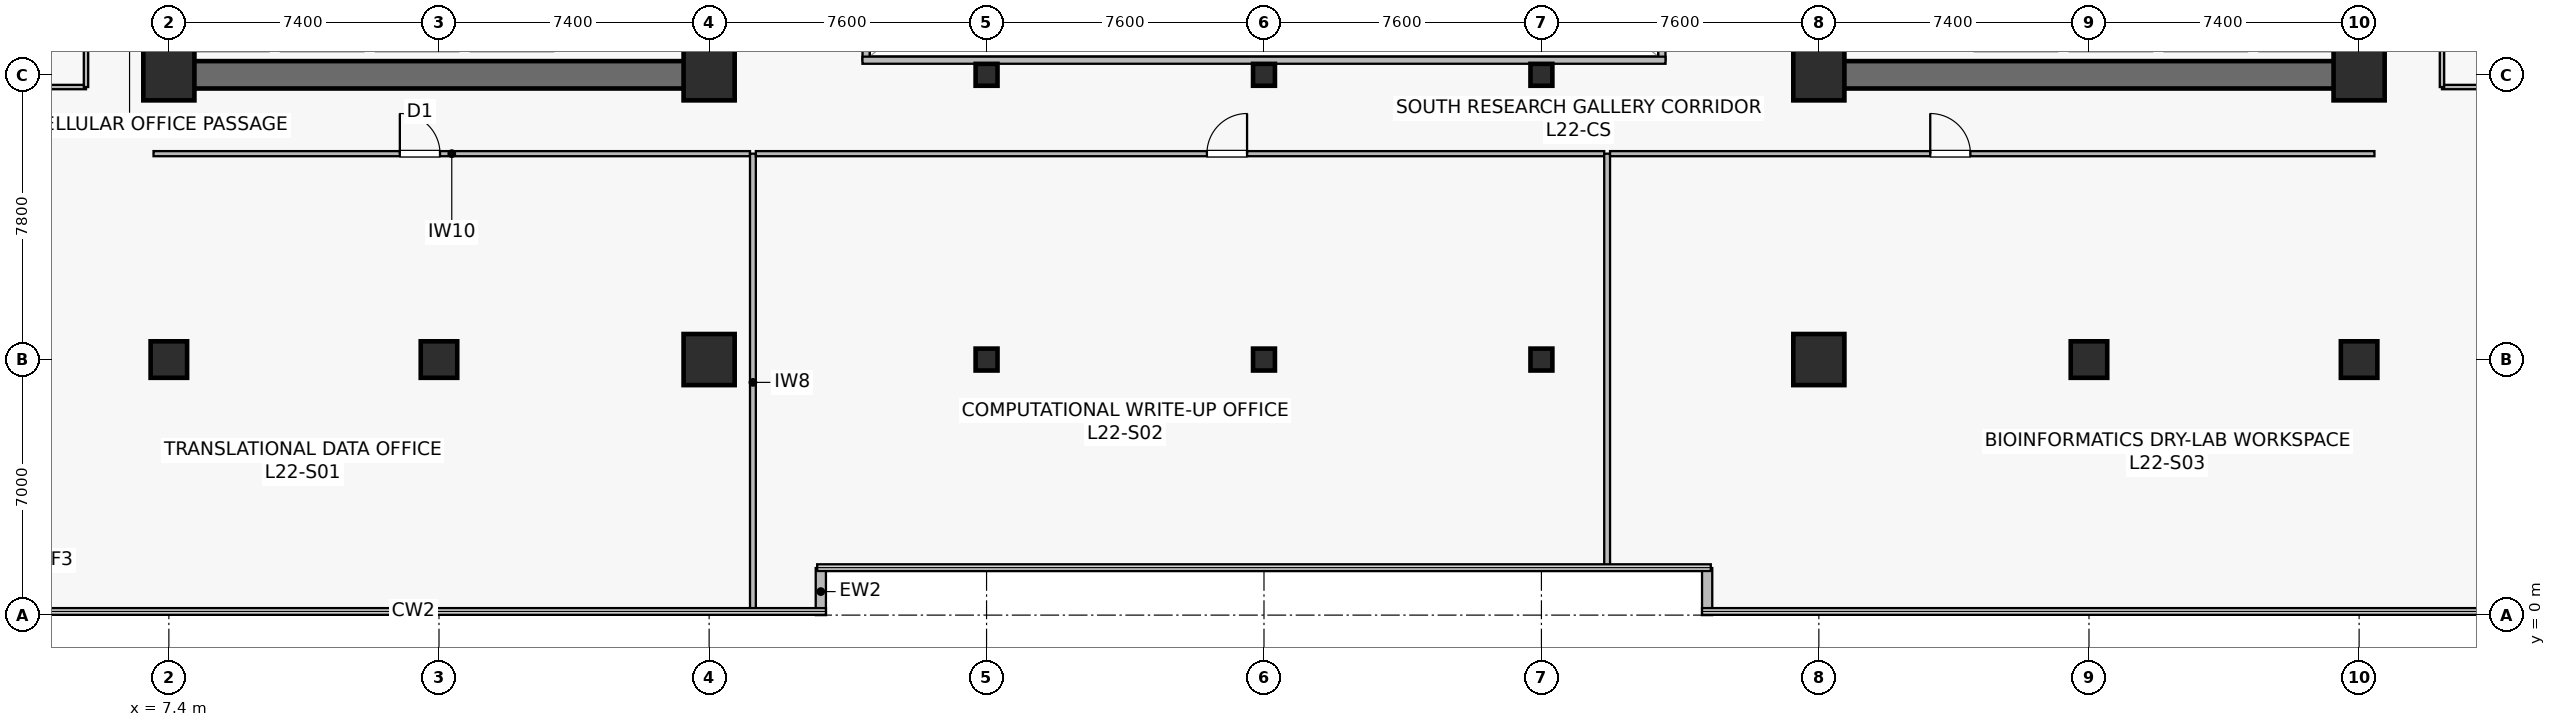
"""IFC4 building model, lengths in metres.
Left out: names, types, materials, properties, quantities, classifications, styles, units other than length and angle.
Written with IfcOpenShell. Run it as: python <this file> out.ifc"""

import sys

from ifc_helpers import new_model, si_unit, direction, frame, frame_2d, origin, origin_2d, place, context, subcontext, project, spatial, rectangle, hollow_rectangle, extrude, source, transform, mapped, element, fill, save


model = new_model("IFC4")
c1 = context("Model", 3, precision=1e-05, world=origin(), true_north=direction((0.0, 1.0)))
c2 = subcontext(c1, "Body", "Model", "MODEL_VIEW")
j1 = project(units=[si_unit("LENGTHUNIT", "METRE"), si_unit("PLANEANGLEUNIT", "RADIAN")], contexts=[c1])
p1 = place(None, origin())
s1 = spatial("IfcSite", under=j1, at=p1, CompositionType="ELEMENT")
p2 = place(p1, origin())
s2 = spatial("IfcBuilding", under=s1, at=p2, CompositionType="ELEMENT")
p3 = place(p2, frame((0.0, 0.0, 90.8)))
s3 = spatial("IfcBuildingStorey", under=s2, at=p3, CompositionType="ELEMENT", Elevation=90.8)
p4 = place(p3, frame((7.025, 14.8, 0.0), z_axis=(0.0, 0.0, 1.0), x_axis=(1.0, 0.0, 0.0)))
e1 = element("IfcWall", 1, at=p4, inside=s3, PredefinedType="SHEAR", context=c2, shape_type="SweptSolid", body=[
    extrude(rectangle(XDim=15.55, YDim=0.75, at=frame_2d((7.775, 0.0))), origin(), (0.0, 0.0, 1.0), 3.78),
])
p5 = place(p3, frame((7.4, 15.175, 0.0), z_axis=(0.0, 0.0, 1.0), x_axis=(0.0, 1.0, 0.0)))
e2 = element("IfcWall", 2, at=p5, inside=s3, PredefinedType="SHEAR", context=c2, shape_type="SweptSolid", body=[
    extrude(rectangle(XDim=18.25, YDim=0.75, at=frame_2d((9.125, 0.0))), origin(), (0.0, 0.0, 1.0), 3.78),
])
p6 = place(p3, frame((22.2, 15.175, 0.0), z_axis=(0.0, 0.0, 1.0), x_axis=(0.0, 1.0, 0.0)))
e3 = element("IfcWall", 3, at=p6, inside=s3, PredefinedType="SHEAR", context=c2, shape_type="SweptSolid", body=[
    extrude(rectangle(XDim=18.25, YDim=0.75, at=frame_2d((9.125, 0.0))), origin(), (0.0, 0.0, 1.0), 3.78),
])
p7 = place(p6, frame((3.375, 0.0, 0.0)))
e4 = element("IfcOpeningElement", 4, at=p7, cuts=e3, PredefinedType="OPENING", context=c2, shape_type="SweptSolid", body=[
    extrude(rectangle(XDim=1.42, YDim=2.2, at=frame_2d((0.71, 1.1))), frame((0.0, 0.385, 0.0), z_axis=(0.0, -1.0, 0.0), x_axis=(1.0, 0.0, 0.0)), (0.0, 0.0, 1.0), 0.77),
])
p8 = place(p3, frame((52.225, 14.8, 0.0), z_axis=(0.0, 0.0, 1.0), x_axis=(1.0, 0.0, 0.0)))
e5 = element("IfcWall", 5, at=p8, inside=s3, PredefinedType="SHEAR", context=c2, shape_type="SweptSolid", body=[
    extrude(rectangle(XDim=15.55, YDim=0.75, at=frame_2d((7.775, 0.0))), origin(), (0.0, 0.0, 1.0), 3.78),
])
p9 = place(p3, frame((52.6, 15.175, 0.0), z_axis=(0.0, 0.0, 1.0), x_axis=(0.0, 1.0, 0.0)))
e6 = element("IfcWall", 6, at=p9, inside=s3, PredefinedType="SHEAR", context=c2, shape_type="SweptSolid", body=[
    extrude(rectangle(XDim=18.25, YDim=0.75, at=frame_2d((9.125, 0.0))), origin(), (0.0, 0.0, 1.0), 3.78),
])
p10 = place(p9, frame((3.375, 0.0, 0.0)))
e7 = element("IfcOpeningElement", 7, at=p10, cuts=e6, PredefinedType="OPENING", context=c2, shape_type="SweptSolid", body=[
    extrude(rectangle(XDim=1.42, YDim=2.2, at=frame_2d((0.71, 1.1))), frame((0.0, 0.385, 0.0), z_axis=(0.0, -1.0, 0.0), x_axis=(1.0, 0.0, 0.0)), (0.0, 0.0, 1.0), 0.77),
])
p11 = place(p3, frame((67.4, 15.175, 0.0), z_axis=(0.0, 0.0, 1.0), x_axis=(0.0, 1.0, 0.0)))
e8 = element("IfcWall", 8, at=p11, inside=s3, PredefinedType="SHEAR", context=c2, shape_type="SweptSolid", body=[
    extrude(rectangle(XDim=18.25, YDim=0.75, at=frame_2d((9.125, 0.0))), origin(), (0.0, 0.0, 1.0), 3.78),
])
m1 = source(origin(), c2, "Body", "SweptSolid", [
    extrude(rectangle(XDim=1.0, YDim=1.0, at=origin_2d()), origin(), (0.0, 0.0, 1.0), 4.1),
])
p12 = place(p3, frame((14.8, 7.0, 0.0), z_axis=(0.0, 0.0, 1.0), x_axis=(1.0, 0.0, 0.0)))
e9 = element("IfcColumn", 9, at=p12, inside=s3, PredefinedType="COLUMN", context=c2, shape_type="MappedRepresentation", body=[
    mapped(m1, transform((0.0, 0.0, 0.0), scale=1.0)),
])
m2 = source(origin(), c2, "Body", "SweptSolid", [
    extrude(rectangle(XDim=1.4, YDim=1.4, at=origin_2d()), origin(), (0.0, 0.0, 1.0), 4.1),
])
for number, where, z_axis, x_axis in (
    (10, (22.2, 7.0, 0.0), (0.0, 0.0, 1.0), (1.0, 0.0, 0.0)),
    (11, (7.4, 14.8, 0.0), (0.0, 0.0, 1.0), (1.0, 0.0, 0.0)),
    (12, (22.2, 14.8, 0.0), (0.0, 0.0, 1.0), (1.0, 0.0, 0.0)),
    (13, (52.6, 7.0, 0.0), (0.0, 0.0, 1.0), (1.0, 0.0, 0.0)),
):
    element("IfcColumn", number, at=place(p3, frame(where, z_axis=z_axis, x_axis=x_axis)), inside=s3, PredefinedType="COLUMN", context=c2, shape_type="MappedRepresentation", body=[
        mapped(m2, transform((0.0, 0.0, 0.0), scale=1.0)),
    ])
p13 = place(p3, frame((60.0, 7.0, 0.0), z_axis=(0.0, 0.0, 1.0), x_axis=(1.0, 0.0, 0.0)))
e14 = element("IfcColumn", 14, at=p13, inside=s3, PredefinedType="COLUMN", context=c2, shape_type="MappedRepresentation", body=[
    mapped(m1, transform((0.0, 0.0, 0.0), scale=1.0)),
])
for number, where, z_axis, x_axis in (
    (15, (52.6, 14.8, 0.0), (0.0, 0.0, 1.0), (1.0, 0.0, 0.0)),
    (16, (67.4, 14.8, 0.0), (0.0, 0.0, 1.0), (1.0, 0.0, 0.0)),
):
    element("IfcColumn", number, at=place(p3, frame(where, z_axis=z_axis, x_axis=x_axis)), inside=s3, PredefinedType="COLUMN", context=c2, shape_type="MappedRepresentation", body=[
        mapped(m2, transform((0.0, 0.0, 0.0), scale=1.0)),
    ])
for number, where, z_axis, x_axis in (
    (17, (7.4, 7.0, 0.0), (0.0, 0.0, 1.0), (1.0, 0.0, 0.0)),
    (18, (67.4, 7.0, 0.0), (0.0, 0.0, 1.0), (1.0, 0.0, 0.0)),
):
    element("IfcColumn", number, at=place(p3, frame(where, z_axis=z_axis, x_axis=x_axis)), inside=s3, PredefinedType="COLUMN", context=c2, shape_type="MappedRepresentation", body=[
        mapped(m1, transform((0.0, 0.0, 0.0), scale=1.0)),
    ])
m3 = source(origin(), c2, "Body", "SweptSolid", [
    extrude(hollow_rectangle(XDim=0.6, YDim=0.6, WallThickness=0.028, at=origin_2d()), origin(), (0.0, 0.0, 1.0), 4.1),
])
for number, where, z_axis, x_axis in (
    (19, (29.8, 7.0, 0.0), (0.0, 0.0, 1.0), (1.0, 0.0, 0.0)),
    (20, (29.8, 14.8, 0.0), (0.0, 0.0, 1.0), (1.0, 0.0, 0.0)),
    (21, (37.4, 7.0, 0.0), (0.0, 0.0, 1.0), (1.0, 0.0, 0.0)),
    (22, (37.4, 14.8, 0.0), (0.0, 0.0, 1.0), (1.0, 0.0, 0.0)),
    (23, (45.0, 7.0, 0.0), (0.0, 0.0, 1.0), (1.0, 0.0, 0.0)),
    (24, (45.0, 14.8, 0.0), (0.0, 0.0, 1.0), (1.0, 0.0, 0.0)),
):
    element("IfcColumn", number, at=place(p3, frame(where, z_axis=z_axis, x_axis=x_axis)), inside=s3, PredefinedType="COLUMN", context=c2, shape_type="MappedRepresentation", body=[
        mapped(m3, transform((0.0, 0.0, 0.0), scale=1.0)),
    ])
for number, where, z_axis, x_axis in (
    (25, (25.26, 0.0, 0.0), (0.0, 0.0, 1.0), (0.0, 1.0, 0.0)),
    (26, (49.54, 1.288, 0.0), (0.0, 0.0, 1.0), (0.0, -1.0, 0.0)),
):
    element("IfcWall", number, at=place(p3, frame(where, z_axis=z_axis, x_axis=x_axis)), inside=s3, PredefinedType="STANDARD", context=c2, shape_type="SweptSolid", body=[
        extrude(rectangle(XDim=1.288, YDim=0.28, at=frame_2d((0.644, 0.0))), origin(), (0.0, 0.0, 1.0), 3.78),
    ])
p14 = place(p3, frame((26.5, 15.2, 0.0), z_axis=(0.0, 0.0, 1.0), x_axis=(0.0, 1.0, 0.0)))
e27 = element("IfcWall", 27, at=p14, inside=s3, PredefinedType="SOLIDWALL", context=c2, shape_type="SweptSolid", body=[
    extrude(rectangle(XDim=18.2, YDim=0.195, at=frame_2d((9.1, 0.0))), origin(), (0.0, 0.0, 1.0), 3.78),
])
p15 = place(p14, frame((1.8, 0.0, 0.9)))
e28 = element("IfcOpeningElement", 28, at=p15, cuts=e27, PredefinedType="OPENING", context=c2, shape_type="SweptSolid", body=[
    extrude(rectangle(XDim=1.5, YDim=1.4, at=frame_2d((0.75, 0.7))), frame((0.0, 0.107, 0.0), z_axis=(0.0, -1.0, 0.0), x_axis=(1.0, 0.0, 0.0)), (0.0, 0.0, 1.0), 0.215),
])
p16 = place(p14, frame((13.2, 0.0, 0.9)))
e29 = element("IfcOpeningElement", 29, at=p16, cuts=e27, PredefinedType="OPENING", context=c2, shape_type="SweptSolid", body=[
    extrude(rectangle(XDim=1.5, YDim=1.4, at=frame_2d((0.75, 0.7))), frame((0.0, 0.107, 0.0), z_axis=(0.0, -1.0, 0.0), x_axis=(1.0, 0.0, 0.0)), (0.0, 0.0, 1.0), 0.215),
])
p17 = place(p3, frame((48.3, 15.2, 0.0), z_axis=(0.0, 0.0, 1.0), x_axis=(0.0, 1.0, 0.0)))
e30 = element("IfcWall", 30, at=p17, inside=s3, PredefinedType="SOLIDWALL", context=c2, shape_type="SweptSolid", body=[
    extrude(rectangle(XDim=18.2, YDim=0.195, at=frame_2d((9.1, 0.0))), origin(), (0.0, 0.0, 1.0), 3.78),
])
p18 = place(p17, frame((1.8, 0.0, 0.9)))
e31 = element("IfcOpeningElement", 31, at=p18, cuts=e30, PredefinedType="OPENING", context=c2, shape_type="SweptSolid", body=[
    extrude(rectangle(XDim=1.5, YDim=1.4, at=frame_2d((0.75, 0.7))), frame((0.0, 0.107, 0.0), z_axis=(0.0, -1.0, 0.0), x_axis=(1.0, 0.0, 0.0)), (0.0, 0.0, 1.0), 0.215),
])
p19 = place(p17, frame((13.2, 0.0, 0.9)))
e32 = element("IfcOpeningElement", 32, at=p19, cuts=e30, PredefinedType="OPENING", context=c2, shape_type="SweptSolid", body=[
    extrude(rectangle(XDim=1.5, YDim=1.4, at=frame_2d((0.75, 0.7))), frame((0.0, 0.107, 0.0), z_axis=(0.0, -1.0, 0.0), x_axis=(1.0, 0.0, 0.0)), (0.0, 0.0, 1.0), 0.215),
])
p20 = place(p3, frame((26.4, 15.2, 0.0), z_axis=(0.0, 0.0, 1.0), x_axis=(1.0, 0.0, 0.0)))
e33 = element("IfcWall", 33, at=p20, inside=s3, PredefinedType="SOLIDWALL", context=c2, shape_type="SweptSolid", body=[
    extrude(rectangle(XDim=22.0, YDim=0.195, at=frame_2d((11.0, 0.0))), origin(), (0.0, 0.0, 1.0), 3.78),
])
p21 = place(p3, frame((6.98, 12.64, 0.0), z_axis=(0.0, 0.0, 1.0), x_axis=(1.0, 0.0, 0.0)))
e34 = element("IfcWall", 34, at=p21, inside=s3, PredefinedType="PARTITIONING", context=c2, shape_type="SweptSolid", body=[
    extrude(rectangle(XDim=16.34, YDim=0.14, at=frame_2d((8.17, 0.0))), origin(), (0.0, 0.0, 1.0), 3.115),
])
p22 = place(p21, frame((6.748, 0.0, 0.0)))
e35 = element("IfcOpeningElement", 35, at=p22, cuts=e34, PredefinedType="OPENING", context=c2, shape_type="SweptSolid", body=[
    extrude(rectangle(XDim=1.1, YDim=2.18, at=frame_2d((0.55, 1.09))), frame((0.0, 0.08, 0.0), z_axis=(0.0, -1.0, 0.0), x_axis=(1.0, 0.0, 0.0)), (0.0, 0.0, 1.0), 0.16),
])
p23 = place(p3, frame((23.4, 0.11, 0.0), z_axis=(0.0, 0.0, 1.0), x_axis=(0.0, 1.0, 0.0)))
e36 = element("IfcWall", 36, at=p23, inside=s3, PredefinedType="PARTITIONING", context=c2, shape_type="SweptSolid", body=[
    extrude(rectangle(XDim=12.53, YDim=0.16, at=frame_2d((6.265, 0.0))), origin(), (0.0, 0.0, 1.0), 3.015),
])
p24 = place(p3, frame((23.48, 12.64, 0.0), z_axis=(0.0, 0.0, 1.0), x_axis=(1.0, 0.0, 0.0)))
e37 = element("IfcWall", 37, at=p24, inside=s3, PredefinedType="PARTITIONING", context=c2, shape_type="SweptSolid", body=[
    extrude(rectangle(XDim=23.24, YDim=0.14, at=frame_2d((11.62, 0.0))), origin(), (0.0, 0.0, 1.0), 3.115),
])
p25 = place(p24, frame((12.356, 0.0, 0.0)))
e38 = element("IfcOpeningElement", 38, at=p25, cuts=e37, PredefinedType="OPENING", context=c2, shape_type="SweptSolid", body=[
    extrude(rectangle(XDim=1.1, YDim=2.18, at=frame_2d((0.55, 1.09))), frame((0.0, 0.08, 0.0), z_axis=(0.0, -1.0, 0.0), x_axis=(1.0, 0.0, 0.0)), (0.0, 0.0, 1.0), 0.16),
])
p26 = place(p3, frame((46.8, 1.31, 0.0), z_axis=(0.0, 0.0, 1.0), x_axis=(0.0, 1.0, 0.0)))
e39 = element("IfcWall", 39, at=p26, inside=s3, PredefinedType="PARTITIONING", context=c2, shape_type="SweptSolid", body=[
    extrude(rectangle(XDim=11.33, YDim=0.16, at=frame_2d((5.665, 0.0))), origin(), (0.0, 0.0, 1.0), 3.015),
])
p27 = place(p3, frame((46.88, 12.64, 0.0), z_axis=(0.0, 0.0, 1.0), x_axis=(1.0, 0.0, 0.0)))
e40 = element("IfcWall", 40, at=p27, inside=s3, PredefinedType="PARTITIONING", context=c2, shape_type="SweptSolid", body=[
    extrude(rectangle(XDim=20.94, YDim=0.14, at=frame_2d((10.47, 0.0))), origin(), (0.0, 0.0, 1.0), 3.115),
])
p28 = place(p27, frame((8.771, 0.0, 0.0)))
e41 = element("IfcOpeningElement", 41, at=p28, cuts=e40, PredefinedType="OPENING", context=c2, shape_type="SweptSolid", body=[
    extrude(rectangle(XDim=1.1, YDim=2.18, at=frame_2d((0.55, 1.09))), frame((0.0, 0.08, 0.0), z_axis=(0.0, -1.0, 0.0), x_axis=(1.0, 0.0, 0.0)), (0.0, 0.0, 1.0), 0.16),
])
p29 = place(p3, frame((0.11, 14.465, 0.0), z_axis=(0.0, 0.0, 1.0), x_axis=(1.0, 0.0, 0.0)))
e42 = element("IfcWall", 42, at=p29, inside=s3, PredefinedType="PARTITIONING", context=c2, shape_type="SweptSolid", body=[
    extrude(rectangle(XDim=5.02, YDim=0.12, at=frame_2d((2.51, 0.0))), origin(), (0.0, 0.0, 1.0), 3.78),
])
p30 = place(p3, frame((5.13, 14.465, 0.0), z_axis=(0.0, 0.0, 1.0), x_axis=(0.0, 1.0, 0.0)))
e43 = element("IfcWall", 43, at=p30, inside=s3, PredefinedType="PARTITIONING", context=c2, shape_type="SweptSolid", body=[
    extrude(rectangle(XDim=4.875, YDim=0.12, at=frame_2d((2.438, 0.0))), origin(), (0.0, 0.0, 1.0), 3.78),
])
p31 = place(p30, frame((1.988, 0.0, 0.0)))
e44 = element("IfcOpeningElement", 44, at=p31, cuts=e43, PredefinedType="OPENING", context=c2, shape_type="SweptSolid", body=[
    extrude(rectangle(XDim=0.9, YDim=2.1, at=frame_2d((0.45, 1.05))), frame((0.0, 0.07, 0.0), z_axis=(0.0, -1.0, 0.0), x_axis=(1.0, 0.0, 0.0)), (0.0, 0.0, 1.0), 0.14),
])
p32 = place(p3, frame((69.67, 14.465, 0.0), z_axis=(0.0, 0.0, 1.0), x_axis=(1.0, 0.0, 0.0)))
e45 = element("IfcWall", 45, at=p32, inside=s3, PredefinedType="PARTITIONING", context=c2, shape_type="SweptSolid", body=[
    extrude(rectangle(XDim=5.02, YDim=0.12, at=frame_2d((2.51, 0.0))), origin(), (0.0, 0.0, 1.0), 3.78),
])
p33 = place(p3, frame((69.67, 14.465, 0.0), z_axis=(0.0, 0.0, 1.0), x_axis=(0.0, 1.0, 0.0)))
e46 = element("IfcWall", 46, at=p33, inside=s3, PredefinedType="PARTITIONING", context=c2, shape_type="SweptSolid", body=[
    extrude(rectangle(XDim=8.075, YDim=0.12, at=frame_2d((4.038, 0.0))), origin(), (0.0, 0.0, 1.0), 3.78),
])
p34 = place(p33, frame((3.587, 0.0, 0.0)))
e47 = element("IfcOpeningElement", 47, at=p34, cuts=e46, PredefinedType="OPENING", context=c2, shape_type="SweptSolid", body=[
    extrude(rectangle(XDim=0.9, YDim=2.1, at=frame_2d((0.45, 1.05))), frame((0.0, 0.07, 0.0), z_axis=(0.0, -1.0, 0.0), x_axis=(1.0, 0.0, 0.0)), (0.0, 0.0, 1.0), 0.14),
])
m4 = source(origin(), c2, "Body", "SweptSolid", [
    extrude(rectangle(XDim=1.1, YDim=2.18, at=frame_2d((0.55, 1.09))), frame((0.0, 0.025, 0.0), z_axis=(0.0, -1.0, 0.0), x_axis=(1.0, 0.0, 0.0)), (0.0, 0.0, 1.0), 0.05),
])
p35 = place(p22, origin())
e48 = element("IfcDoor", 48, at=p35, inside=s3, OperationType="SINGLE_SWING_LEFT", PredefinedType="DOOR", context=c2, shape_type="MappedRepresentation", body=[
    mapped(m4, transform((0.0, 0.0, 0.0), scale=1.0)),
])
fill(e35, e48)
p36 = place(p25, origin())
e49 = element("IfcDoor", 49, at=p36, inside=s3, OperationType="SINGLE_SWING_RIGHT", PredefinedType="DOOR", context=c2, shape_type="MappedRepresentation", body=[
    mapped(m4, transform((0.0, 0.0, 0.0), scale=1.0)),
])
fill(e38, e49)
p37 = place(p28, origin())
e50 = element("IfcDoor", 50, at=p37, inside=s3, OperationType="SINGLE_SWING_LEFT", PredefinedType="DOOR", context=c2, shape_type="MappedRepresentation", body=[
    mapped(m4, transform((0.0, 0.0, 0.0), scale=1.0)),
])
fill(e41, e50)
save(model, sys.argv[1])
